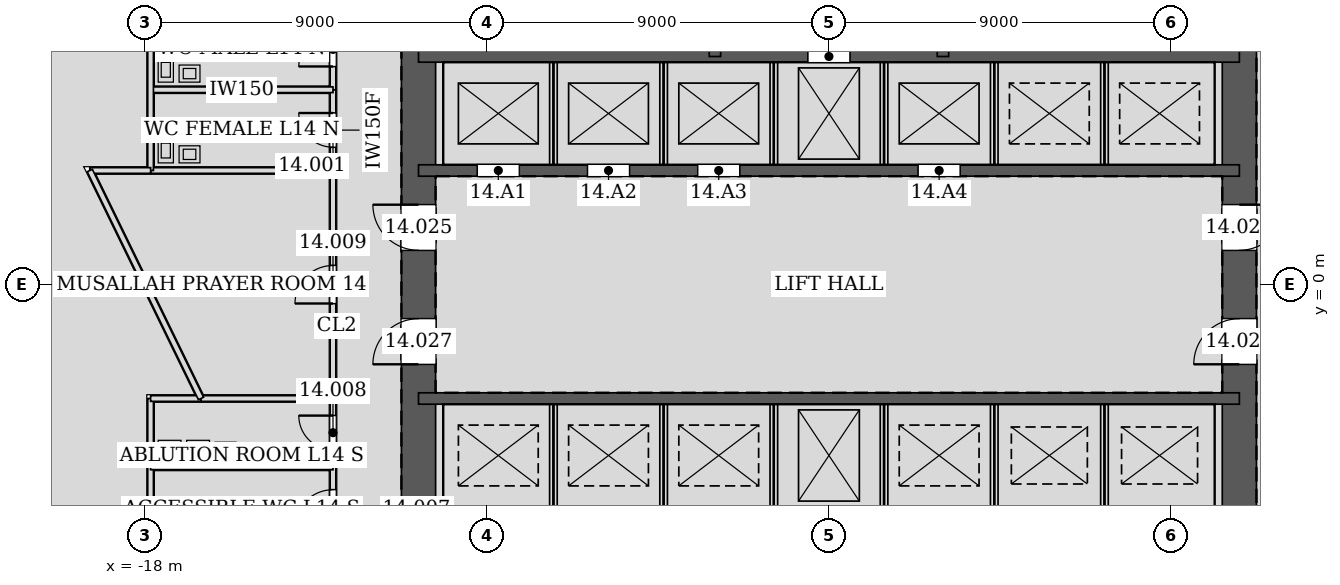
"""IFC4 building model, lengths in metres.
Left out: names, types, materials, properties, quantities, classifications, styles, units other than length and angle.
Written with IfcOpenShell. Run it as: python <this file> out.ifc"""

import sys

from ifc_helpers import new_model, si_unit, direction, frame, frame_2d, origin, place, context, subcontext, project, spatial, rectangle, extrude, element, fill, save


model = new_model("IFC4")
c1 = context("Model", 3, precision=1e-05, world=origin(), true_north=direction((0.0, 1.0)))
c2 = subcontext(c1, "Body", "Model", "MODEL_VIEW")
j1 = project(units=[si_unit("LENGTHUNIT", "METRE"), si_unit("PLANEANGLEUNIT", "RADIAN")], contexts=[c1])
p1 = place(None, origin())
s1 = spatial("IfcSite", under=j1, at=p1, CompositionType="ELEMENT")
p2 = place(p1, origin())
s2 = spatial("IfcBuilding", under=s1, at=p2, CompositionType="ELEMENT")
p3 = place(p2, frame((0.0, 0.0, 66.6)))
s3 = spatial("IfcBuildingStorey", under=s2, at=p3, CompositionType="ELEMENT", Elevation=66.6)
p4 = place(p3, frame((10.8, -10.8, 0.0), z_axis=(0.0, 0.0, 1.0), x_axis=(0.0, 1.0, 0.0)))
e1 = element("IfcWall", 1, at=p4, inside=s3, PredefinedType="SOLIDWALL", context=c2, shape_type="SweptSolid", body=[
    extrude(rectangle(XDim=21.6, YDim=0.9, at=frame_2d((10.8, 0.0))), origin(), (0.0, 0.0, 1.0), 4.2),
])
p5 = place(p4, frame((11.7, 0.0, 0.0)))
e2 = element("IfcOpeningElement", 2, at=p5, cuts=e1, PredefinedType="OPENING", context=c2, shape_type="SweptSolid", body=[
    extrude(rectangle(XDim=1.2, YDim=2.1, at=frame_2d((0.6, 1.05))), frame((0.0, 0.46, 0.0), z_axis=(0.0, -1.0, 0.0), x_axis=(1.0, 0.0, 0.0)), (0.0, 0.0, 1.0), 0.92),
])
p6 = place(p4, frame((8.7, 0.0, 0.0)))
e3 = element("IfcOpeningElement", 3, at=p6, cuts=e1, PredefinedType="OPENING", context=c2, shape_type="SweptSolid", body=[
    extrude(rectangle(XDim=1.2, YDim=2.1, at=frame_2d((0.6, 1.05))), frame((0.0, 0.46, 0.0), z_axis=(0.0, -1.0, 0.0), x_axis=(1.0, 0.0, 0.0)), (0.0, 0.0, 1.0), 0.92),
])
p7 = place(p3, frame((-10.8, 10.8, 0.0), z_axis=(0.0, 0.0, 1.0), x_axis=(0.0, -1.0, 0.0)))
e4 = element("IfcWall", 4, at=p7, inside=s3, PredefinedType="SOLIDWALL", context=c2, shape_type="SweptSolid", body=[
    extrude(rectangle(XDim=21.6, YDim=0.9, at=frame_2d((10.8, 0.0))), origin(), (0.0, 0.0, 1.0), 4.2),
])
p8 = place(p7, frame((8.7, 0.0, 0.0)))
e5 = element("IfcOpeningElement", 5, at=p8, cuts=e4, PredefinedType="OPENING", context=c2, shape_type="SweptSolid", body=[
    extrude(rectangle(XDim=1.2, YDim=2.1, at=frame_2d((0.6, 1.05))), frame((0.0, 0.46, 0.0), z_axis=(0.0, -1.0, 0.0), x_axis=(1.0, 0.0, 0.0)), (0.0, 0.0, 1.0), 0.92),
])
p9 = place(p7, frame((11.7, 0.0, 0.0)))
e6 = element("IfcOpeningElement", 6, at=p9, cuts=e4, PredefinedType="OPENING", context=c2, shape_type="SweptSolid", body=[
    extrude(rectangle(XDim=1.2, YDim=2.1, at=frame_2d((0.6, 1.05))), frame((0.0, 0.46, 0.0), z_axis=(0.0, -1.0, 0.0), x_axis=(1.0, 0.0, 0.0)), (0.0, 0.0, 1.0), 0.92),
])
p10 = place(p3, frame((-10.8, 3.0, 0.0), z_axis=(0.0, 0.0, 1.0), x_axis=(1.0, 0.0, 0.0)))
e7 = element("IfcWall", 7, at=p10, inside=s3, PredefinedType="SOLIDWALL", context=c2, shape_type="SweptSolid", body=[
    extrude(rectangle(XDim=21.6, YDim=0.3, at=frame_2d((10.8, 0.0))), origin(), (0.0, 0.0, 1.0), 4.2),
])
p11 = place(p10, frame((1.55, 0.0, 0.0)))
e8 = element("IfcOpeningElement", 8, at=p11, cuts=e7, PredefinedType="OPENING", context=c2, shape_type="SweptSolid", body=[
    extrude(rectangle(XDim=1.1, YDim=2.1, at=frame_2d((0.55, 1.05))), frame((0.0, 0.16, 0.0), z_axis=(0.0, -1.0, 0.0), x_axis=(1.0, 0.0, 0.0)), (0.0, 0.0, 1.0), 0.32),
])
p12 = place(p10, frame((4.45, 0.0, 0.0)))
e9 = element("IfcOpeningElement", 9, at=p12, cuts=e7, PredefinedType="OPENING", context=c2, shape_type="SweptSolid", body=[
    extrude(rectangle(XDim=1.1, YDim=2.1, at=frame_2d((0.55, 1.05))), frame((0.0, 0.16, 0.0), z_axis=(0.0, -1.0, 0.0), x_axis=(1.0, 0.0, 0.0)), (0.0, 0.0, 1.0), 0.32),
])
p13 = place(p10, frame((7.35, 0.0, 0.0)))
e10 = element("IfcOpeningElement", 10, at=p13, cuts=e7, PredefinedType="OPENING", context=c2, shape_type="SweptSolid", body=[
    extrude(rectangle(XDim=1.1, YDim=2.1, at=frame_2d((0.55, 1.05))), frame((0.0, 0.16, 0.0), z_axis=(0.0, -1.0, 0.0), x_axis=(1.0, 0.0, 0.0)), (0.0, 0.0, 1.0), 0.32),
])
p14 = place(p10, frame((13.15, 0.0, 0.0)))
e11 = element("IfcOpeningElement", 11, at=p14, cuts=e7, PredefinedType="OPENING", context=c2, shape_type="SweptSolid", body=[
    extrude(rectangle(XDim=1.1, YDim=2.1, at=frame_2d((0.55, 1.05))), frame((0.0, 0.16, 0.0), z_axis=(0.0, -1.0, 0.0), x_axis=(1.0, 0.0, 0.0)), (0.0, 0.0, 1.0), 0.32),
])
p15 = place(p3, frame((-10.8, 6.0, 0.0), z_axis=(0.0, 0.0, 1.0), x_axis=(1.0, 0.0, 0.0)))
e12 = element("IfcWall", 12, at=p15, inside=s3, PredefinedType="SOLIDWALL", context=c2, shape_type="SweptSolid", body=[
    extrude(rectangle(XDim=21.6, YDim=0.3, at=frame_2d((10.8, 0.0))), origin(), (0.0, 0.0, 1.0), 4.2),
])
p16 = place(p15, frame((10.25, 0.0, 0.0)))
e13 = element("IfcOpeningElement", 13, at=p16, cuts=e12, PredefinedType="OPENING", context=c2, shape_type="SweptSolid", body=[
    extrude(rectangle(XDim=1.1, YDim=2.1, at=frame_2d((0.55, 1.05))), frame((0.0, 0.16, 0.0), z_axis=(0.0, -1.0, 0.0), x_axis=(1.0, 0.0, 0.0)), (0.0, 0.0, 1.0), 0.32),
])
p17 = place(p3, frame((-3.0, 6.0, 0.0), z_axis=(0.0, 0.0, 1.0), x_axis=(0.0, 1.0, 0.0)))
e14 = element("IfcWall", 14, at=p17, inside=s3, PredefinedType="SOLIDWALL", context=c2, shape_type="SweptSolid", body=[
    extrude(rectangle(XDim=4.8, YDim=0.3, at=frame_2d((2.4, 0.0))), origin(), (0.0, 0.0, 1.0), 4.2),
])
p18 = place(p17, frame((1.75, 0.0, 0.0)))
e15 = element("IfcOpeningElement", 15, at=p18, cuts=e14, PredefinedType="OPENING", context=c2, shape_type="SweptSolid", body=[
    extrude(rectangle(XDim=1.0, YDim=2.1, at=frame_2d((0.5, 1.05))), frame((0.0, 0.16, 0.0), z_axis=(0.0, -1.0, 0.0), x_axis=(1.0, 0.0, 0.0)), (0.0, 0.0, 1.0), 0.32),
])
p19 = place(p3, frame((3.0, 6.0, 0.0), z_axis=(0.0, 0.0, 1.0), x_axis=(0.0, 1.0, 0.0)))
e16 = element("IfcWall", 16, at=p19, inside=s3, PredefinedType="SOLIDWALL", context=c2, shape_type="SweptSolid", body=[
    extrude(rectangle(XDim=4.8, YDim=0.3, at=frame_2d((2.4, 0.0))), origin(), (0.0, 0.0, 1.0), 4.2),
])
p20 = place(p19, frame((1.75, 0.0, 0.0)))
e17 = element("IfcOpeningElement", 17, at=p20, cuts=e16, PredefinedType="OPENING", context=c2, shape_type="SweptSolid", body=[
    extrude(rectangle(XDim=1.0, YDim=2.1, at=frame_2d((0.5, 1.05))), frame((0.0, 0.16, 0.0), z_axis=(0.0, -1.0, 0.0), x_axis=(1.0, 0.0, 0.0)), (0.0, 0.0, 1.0), 0.32),
])
p21 = place(p3, frame((-10.8, -3.0, 0.0), z_axis=(0.0, 0.0, 1.0), x_axis=(1.0, 0.0, 0.0)))
e18 = element("IfcWall", 18, at=p21, inside=s3, PredefinedType="SOLIDWALL", context=c2, shape_type="SweptSolid", body=[
    extrude(rectangle(XDim=21.6, YDim=0.3, at=frame_2d((10.8, 0.0))), origin(), (0.0, 0.0, 1.0), 4.2),
])
p22 = place(p3, frame((-13.05, 5.126, 0.0), z_axis=(0.0, 0.0, 1.0), x_axis=(0.0, -1.0, 0.0)))
e19 = element("IfcWall", 19, at=p22, inside=s3, PredefinedType="PARTITIONING", context=c2, shape_type="SweptSolid", body=[
    extrude(rectangle(XDim=2.127, YDim=0.15, at=frame_2d((1.063, 0.0))), origin(), (0.0, 0.0, 1.0), 4.035),
])
p23 = place(p22, frame((0.614, 0.0, 0.0)))
e20 = element("IfcOpeningElement", 20, at=p23, cuts=e19, PredefinedType="OPENING", context=c2, shape_type="SweptSolid", body=[
    extrude(rectangle(XDim=0.9, YDim=2.1, at=frame_2d((0.45, 1.05))), frame((0.0, 0.085, 0.0), z_axis=(0.0, -1.0, 0.0), x_axis=(1.0, 0.0, 0.0)), (0.0, 0.0, 1.0), 0.17),
])
p24 = place(p3, frame((-13.05, 7.251, 0.0), z_axis=(0.0, 0.0, 1.0), x_axis=(0.0, -1.0, 0.0)))
e21 = element("IfcWall", 21, at=p24, inside=s3, PredefinedType="PARTITIONING", context=c2, shape_type="SweptSolid", body=[
    extrude(rectangle(XDim=2.127, YDim=0.15, at=frame_2d((1.063, 0.0))), origin(), (0.0, 0.0, 1.0), 4.035),
])
p25 = place(p24, frame((0.614, 0.0, 0.0)))
e22 = element("IfcOpeningElement", 22, at=p25, cuts=e21, PredefinedType="OPENING", context=c2, shape_type="SweptSolid", body=[
    extrude(rectangle(XDim=0.9, YDim=2.1, at=frame_2d((0.45, 1.05))), frame((0.0, 0.085, 0.0), z_axis=(0.0, -1.0, 0.0), x_axis=(1.0, 0.0, 0.0)), (0.0, 0.0, 1.0), 0.17),
])
p26 = place(p3, frame((-13.05, -4.799, 0.0), z_axis=(0.0, 0.0, 1.0), x_axis=(0.0, -1.0, 0.0)))
e23 = element("IfcWall", 23, at=p26, inside=s3, PredefinedType="PARTITIONING", context=c2, shape_type="SweptSolid", body=[
    extrude(rectangle(XDim=2.202, YDim=0.15, at=frame_2d((1.101, 0.0))), origin(), (0.0, 0.0, 1.0), 4.035),
])
p27 = place(p26, frame((0.601, 0.0, 0.0)))
e24 = element("IfcOpeningElement", 24, at=p27, cuts=e23, PredefinedType="OPENING", context=c2, shape_type="SweptSolid", body=[
    extrude(rectangle(XDim=1.0, YDim=2.1, at=frame_2d((0.5, 1.05))), frame((0.0, 0.085, 0.0), z_axis=(0.0, -1.0, 0.0), x_axis=(1.0, 0.0, 0.0)), (0.0, 0.0, 1.0), 0.17),
])
p28 = place(p3, frame((-13.05, -2.999, 0.0), z_axis=(0.0, 0.0, 1.0), x_axis=(0.0, -1.0, 0.0)))
e25 = element("IfcWall", 25, at=p28, inside=s3, PredefinedType="PARTITIONING", context=c2, shape_type="SweptSolid", body=[
    extrude(rectangle(XDim=1.802, YDim=0.15, at=frame_2d((0.901, 0.0))), origin(), (0.0, 0.0, 1.0), 4.035),
])
p29 = place(p28, frame((0.451, 0.0, 0.0)))
e26 = element("IfcOpeningElement", 26, at=p29, cuts=e25, PredefinedType="OPENING", context=c2, shape_type="SweptSolid", body=[
    extrude(rectangle(XDim=0.9, YDim=2.1, at=frame_2d((0.45, 1.05))), frame((0.0, 0.085, 0.0), z_axis=(0.0, -1.0, 0.0), x_axis=(1.0, 0.0, 0.0)), (0.0, 0.0, 1.0), 0.17),
])
p30 = place(p3, frame((-13.05, 3.001, 0.0), z_axis=(0.0, 0.0, 1.0), x_axis=(0.0, -1.0, 0.0)))
e27 = element("IfcWall", 27, at=p30, inside=s3, PredefinedType="PARTITIONING", context=c2, shape_type="SweptSolid", body=[
    extrude(rectangle(XDim=6.002, YDim=0.15, at=frame_2d((3.001, 0.0))), origin(), (0.0, 0.0, 1.0), 3.065),
])
p31 = place(p30, frame((2.501, 0.0, 0.0)))
e28 = element("IfcOpeningElement", 28, at=p31, cuts=e27, PredefinedType="OPENING", context=c2, shape_type="SweptSolid", body=[
    extrude(rectangle(XDim=1.0, YDim=2.1, at=frame_2d((0.5, 1.05))), frame((0.0, 0.085, 0.0), z_axis=(0.0, -1.0, 0.0), x_axis=(1.0, 0.0, 0.0)), (0.0, 0.0, 1.0), 0.17),
])
for number, where, z_axis, x_axis in (
    (29, (-13.05, 5.125, 0.0), (0.0, 0.0, 1.0), (-1.0, 0.0, 0.0)),
    (30, (-17.85, 3.0, 0.0), (0.0, 0.0, 1.0), (1.0, 0.0, 0.0)),
):
    element("IfcWall", number, at=place(p3, frame(where, z_axis=z_axis, x_axis=x_axis)), inside=s3, PredefinedType="PARTITIONING", context=c2, shape_type="SweptSolid", body=[
        extrude(rectangle(XDim=4.8, YDim=0.15, at=frame_2d((2.4, 0.0))), origin(), (0.0, 0.0, 1.0), 3.423),
    ])
p32 = place(p3, frame((-17.85, 3.0, 0.0), z_axis=(0.0, 0.0, 1.0), x_axis=(0.0, 1.0, 0.0)))
e31 = element("IfcWall", 31, at=p32, inside=s3, PredefinedType="PARTITIONING", context=c2, shape_type="SweptSolid", body=[
    extrude(rectangle(XDim=6.45, YDim=0.15, at=frame_2d((3.225, 0.0))), origin(), (0.0, 0.0, 1.0), 4.035),
])
p33 = place(p3, frame((-17.85, -9.125, 0.0), z_axis=(0.0, 0.0, 1.0), x_axis=(0.0, 1.0, 0.0)))
e32 = element("IfcWall", 32, at=p33, inside=s3, PredefinedType="PARTITIONING", context=c2, shape_type="SweptSolid", body=[
    extrude(rectangle(XDim=6.125, YDim=0.15, at=frame_2d((3.062, 0.0))), origin(), (0.0, 0.0, 1.0), 4.035),
])
p34 = place(p3, frame((-13.05, -4.8, 0.0), z_axis=(0.0, 0.0, 1.0), x_axis=(-1.0, 0.0, 0.0)))
e33 = element("IfcWall", 33, at=p34, inside=s3, PredefinedType="PARTITIONING", context=c2, shape_type="SweptSolid", body=[
    extrude(rectangle(XDim=4.8, YDim=0.15, at=frame_2d((2.4, 0.0))), origin(), (0.0, 0.0, 1.0), 3.423),
])
p35 = place(p3, frame((-13.05, -3.0, 0.0), z_axis=(0.0, 0.0, 1.0), x_axis=(-1.0, 0.0, 0.0)))
e34 = element("IfcWall", 34, at=p35, inside=s3, PredefinedType="PARTITIONING", context=c2, shape_type="SweptSolid", body=[
    extrude(rectangle(XDim=3.475, YDim=0.15, at=frame_2d((1.737, 0.0))), origin(), (0.0, 0.0, 1.0), 3.423),
])
p36 = place(p3, frame((-16.522, -3.0, 0.0), z_axis=(0.0, 0.0, 1.0), x_axis=(-1.0, 0.0, 0.0)))
e35 = element("IfcWall", 35, at=p36, inside=s3, PredefinedType="PARTITIONING", context=c2, shape_type="SweptSolid", body=[
    extrude(rectangle(XDim=1.328, YDim=0.15, at=frame_2d((0.664, 0.0))), origin(), (0.0, 0.0, 1.0), 3.497),
])
p37 = place(p3, frame((-17.849, 3.0, 0.0), z_axis=(0.0, 0.0, 1.0), x_axis=(-1.0, 0.0, 0.0)))
e36 = element("IfcWall", 36, at=p37, inside=s3, PredefinedType="PARTITIONING", context=c2, shape_type="SweptSolid", body=[
    extrude(rectangle(XDim=1.601, YDim=0.15, at=frame_2d((0.8, 0.0))), origin(), (0.0, 0.0, 1.0), 3.497),
])
p38 = place(p3, frame((-19.45, 3.0, 0.0), z_axis=(0.0, 0.0, 1.0), x_axis=(0.43835589904, -0.898801482963, 0.0)))
e37 = element("IfcWall", 37, at=p38, inside=s3, PredefinedType="PARTITIONING", context=c2, shape_type="SweptSolid", body=[
    extrude(rectangle(XDim=6.676, YDim=0.15, at=frame_2d((3.338, 0.0))), origin(), (0.0, 0.0, 1.0), 3.065),
])
for number, where, z_axis, x_axis in (
    (38, (-7.25, 3.15, 0.0), (0.0, 0.0, 1.0), (0.0, 1.0, 0.0)),
    (39, (-4.35, 3.15, 0.0), (0.0, 0.0, 1.0), (0.0, 1.0, 0.0)),
    (40, (-1.45, 3.15, 0.0), (0.0, 0.0, 1.0), (0.0, 1.0, 0.0)),
    (41, (1.45, 3.15, 0.0), (0.0, 0.0, 1.0), (0.0, 1.0, 0.0)),
    (42, (4.35, 3.15, 0.0), (0.0, 0.0, 1.0), (0.0, 1.0, 0.0)),
    (43, (7.25, 3.15, 0.0), (0.0, 0.0, 1.0), (0.0, 1.0, 0.0)),
    (44, (-7.25, -5.85, 0.0), (0.0, 0.0, 1.0), (0.0, 1.0, 0.0)),
    (45, (-4.35, -5.85, 0.0), (0.0, 0.0, 1.0), (0.0, 1.0, 0.0)),
    (46, (-1.45, -5.85, 0.0), (0.0, 0.0, 1.0), (0.0, 1.0, 0.0)),
    (47, (1.45, -5.85, 0.0), (0.0, 0.0, 1.0), (0.0, 1.0, 0.0)),
    (48, (4.35, -5.85, 0.0), (0.0, 0.0, 1.0), (0.0, 1.0, 0.0)),
    (49, (7.25, -5.85, 0.0), (0.0, 0.0, 1.0), (0.0, 1.0, 0.0)),
):
    element("IfcWall", number, at=place(p3, frame(where, z_axis=z_axis, x_axis=x_axis)), inside=s3, PredefinedType="PARTITIONING", context=c2, shape_type="SweptSolid", body=[
        extrude(rectangle(XDim=2.7, YDim=0.2, at=frame_2d((1.35, 0.0))), origin(), (0.0, 0.0, 1.0), 4.2),
    ])
p39 = place(p23, frame((0.9, 0.0, 0.0), z_axis=(0.0, 0.0, 1.0), x_axis=(-1.0, 0.0, 0.0)))
e50 = element("IfcDoor", 50, at=p39, inside=s3, OperationType="SINGLE_SWING_RIGHT", PredefinedType="DOOR", context=c2, shape_type="SweptSolid", body=[
    extrude(rectangle(XDim=0.9, YDim=2.1, at=frame_2d((0.45, 1.05))), frame((0.0, 0.025, 0.0), z_axis=(0.0, -1.0, 0.0), x_axis=(1.0, 0.0, 0.0)), (0.0, 0.0, 1.0), 0.05),
])
fill(e20, e50)
p40 = place(p25, frame((0.9, 0.0, 0.0), z_axis=(0.0, 0.0, 1.0), x_axis=(-1.0, 0.0, 0.0)))
e51 = element("IfcDoor", 51, at=p40, inside=s3, OperationType="SINGLE_SWING_LEFT", PredefinedType="DOOR", context=c2, shape_type="SweptSolid", body=[
    extrude(rectangle(XDim=0.9, YDim=2.1, at=frame_2d((0.45, 1.05))), frame((0.0, 0.025, 0.0), z_axis=(0.0, -1.0, 0.0), x_axis=(1.0, 0.0, 0.0)), (0.0, 0.0, 1.0), 0.05),
])
fill(e22, e51)
p41 = place(p27, frame((1.0, 0.0, 0.0), z_axis=(0.0, 0.0, 1.0), x_axis=(-1.0, 0.0, 0.0)))
e52 = element("IfcDoor", 52, at=p41, inside=s3, OperationType="SINGLE_SWING_LEFT", PredefinedType="DOOR", context=c2, shape_type="SweptSolid", body=[
    extrude(rectangle(XDim=1.0, YDim=2.1, at=frame_2d((0.5, 1.05))), frame((0.0, 0.025, 0.0), z_axis=(0.0, -1.0, 0.0), x_axis=(1.0, 0.0, 0.0)), (0.0, 0.0, 1.0), 0.05),
])
fill(e24, e52)
p42 = place(p29, frame((0.9, 0.0, 0.0), z_axis=(0.0, 0.0, 1.0), x_axis=(-1.0, 0.0, 0.0)))
e53 = element("IfcDoor", 53, at=p42, inside=s3, OperationType="SINGLE_SWING_RIGHT", PredefinedType="DOOR", context=c2, shape_type="SweptSolid", body=[
    extrude(rectangle(XDim=0.9, YDim=2.1, at=frame_2d((0.45, 1.05))), frame((0.0, 0.025, 0.0), z_axis=(0.0, -1.0, 0.0), x_axis=(1.0, 0.0, 0.0)), (0.0, 0.0, 1.0), 0.05),
])
fill(e26, e53)
p43 = place(p31, frame((1.0, 0.0, 0.0), z_axis=(0.0, 0.0, 1.0), x_axis=(-1.0, 0.0, 0.0)))
e54 = element("IfcDoor", 54, at=p43, inside=s3, OperationType="SINGLE_SWING_LEFT", PredefinedType="DOOR", context=c2, shape_type="SweptSolid", body=[
    extrude(rectangle(XDim=1.0, YDim=2.1, at=frame_2d((0.5, 1.05))), frame((0.0, 0.025, 0.0), z_axis=(0.0, -1.0, 0.0), x_axis=(1.0, 0.0, 0.0)), (0.0, 0.0, 1.0), 0.05),
])
fill(e28, e54)
p44 = place(p5, frame((1.2, 0.0, 0.0), z_axis=(0.0, 0.0, 1.0), x_axis=(-1.0, 0.0, 0.0)))
e55 = element("IfcDoor", 55, at=p44, inside=s3, OperationType="SINGLE_SWING_LEFT", PredefinedType="DOOR", context=c2, shape_type="SweptSolid", body=[
    extrude(rectangle(XDim=1.2, YDim=2.1, at=frame_2d((0.6, 1.05))), frame((0.0, 0.025, 0.0), z_axis=(0.0, -1.0, 0.0), x_axis=(1.0, 0.0, 0.0)), (0.0, 0.0, 1.0), 0.05),
])
fill(e2, e55)
p45 = place(p8, frame((1.2, 0.0, 0.0), z_axis=(0.0, 0.0, 1.0), x_axis=(-1.0, 0.0, 0.0)))
e56 = element("IfcDoor", 56, at=p45, inside=s3, OperationType="SINGLE_SWING_RIGHT", PredefinedType="DOOR", context=c2, shape_type="SweptSolid", body=[
    extrude(rectangle(XDim=1.2, YDim=2.1, at=frame_2d((0.6, 1.05))), frame((0.0, 0.025, 0.0), z_axis=(0.0, -1.0, 0.0), x_axis=(1.0, 0.0, 0.0)), (0.0, 0.0, 1.0), 0.05),
])
fill(e5, e56)
p46 = place(p6, origin())
e57 = element("IfcDoor", 57, at=p46, inside=s3, OperationType="SINGLE_SWING_LEFT", PredefinedType="DOOR", context=c2, shape_type="SweptSolid", body=[
    extrude(rectangle(XDim=1.2, YDim=2.1, at=frame_2d((0.6, 1.05))), frame((0.0, 0.025, 0.0), z_axis=(0.0, -1.0, 0.0), x_axis=(1.0, 0.0, 0.0)), (0.0, 0.0, 1.0), 0.05),
])
fill(e3, e57)
p47 = place(p9, frame((1.2, 0.0, 0.0), z_axis=(0.0, 0.0, 1.0), x_axis=(-1.0, 0.0, 0.0)))
e58 = element("IfcDoor", 58, at=p47, inside=s3, OperationType="SINGLE_SWING_LEFT", PredefinedType="DOOR", context=c2, shape_type="SweptSolid", body=[
    extrude(rectangle(XDim=1.2, YDim=2.1, at=frame_2d((0.6, 1.05))), frame((0.0, 0.025, 0.0), z_axis=(0.0, -1.0, 0.0), x_axis=(1.0, 0.0, 0.0)), (0.0, 0.0, 1.0), 0.05),
])
fill(e6, e58)
p48 = place(p11, origin())
e59 = element("IfcDoor", 59, at=p48, inside=s3, OperationType="DOUBLE_DOOR_SLIDING", PredefinedType="DOOR", context=c2, shape_type="SweptSolid", body=[
    extrude(rectangle(XDim=1.1, YDim=2.1, at=frame_2d((0.55, 1.05))), frame((0.0, 0.025, 0.0), z_axis=(0.0, -1.0, 0.0), x_axis=(1.0, 0.0, 0.0)), (0.0, 0.0, 1.0), 0.05),
])
fill(e8, e59)
p49 = place(p12, origin())
e60 = element("IfcDoor", 60, at=p49, inside=s3, OperationType="DOUBLE_DOOR_SLIDING", PredefinedType="DOOR", context=c2, shape_type="SweptSolid", body=[
    extrude(rectangle(XDim=1.1, YDim=2.1, at=frame_2d((0.55, 1.05))), frame((0.0, 0.025, 0.0), z_axis=(0.0, -1.0, 0.0), x_axis=(1.0, 0.0, 0.0)), (0.0, 0.0, 1.0), 0.05),
])
fill(e9, e60)
p50 = place(p13, origin())
e61 = element("IfcDoor", 61, at=p50, inside=s3, OperationType="DOUBLE_DOOR_SLIDING", PredefinedType="DOOR", context=c2, shape_type="SweptSolid", body=[
    extrude(rectangle(XDim=1.1, YDim=2.1, at=frame_2d((0.55, 1.05))), frame((0.0, 0.025, 0.0), z_axis=(0.0, -1.0, 0.0), x_axis=(1.0, 0.0, 0.0)), (0.0, 0.0, 1.0), 0.05),
])
fill(e10, e61)
p51 = place(p16, origin())
e62 = element("IfcDoor", 62, at=p51, inside=s3, OperationType="DOUBLE_DOOR_SLIDING", PredefinedType="DOOR", context=c2, shape_type="SweptSolid", body=[
    extrude(rectangle(XDim=1.1, YDim=2.1, at=frame_2d((0.55, 1.05))), frame((0.0, 0.025, 0.0), z_axis=(0.0, -1.0, 0.0), x_axis=(1.0, 0.0, 0.0)), (0.0, 0.0, 1.0), 0.05),
])
fill(e13, e62)
p52 = place(p14, origin())
e63 = element("IfcDoor", 63, at=p52, inside=s3, OperationType="DOUBLE_DOOR_SLIDING", PredefinedType="DOOR", context=c2, shape_type="SweptSolid", body=[
    extrude(rectangle(XDim=1.1, YDim=2.1, at=frame_2d((0.55, 1.05))), frame((0.0, 0.025, 0.0), z_axis=(0.0, -1.0, 0.0), x_axis=(1.0, 0.0, 0.0)), (0.0, 0.0, 1.0), 0.05),
])
fill(e11, e63)
save(model, sys.argv[1])
